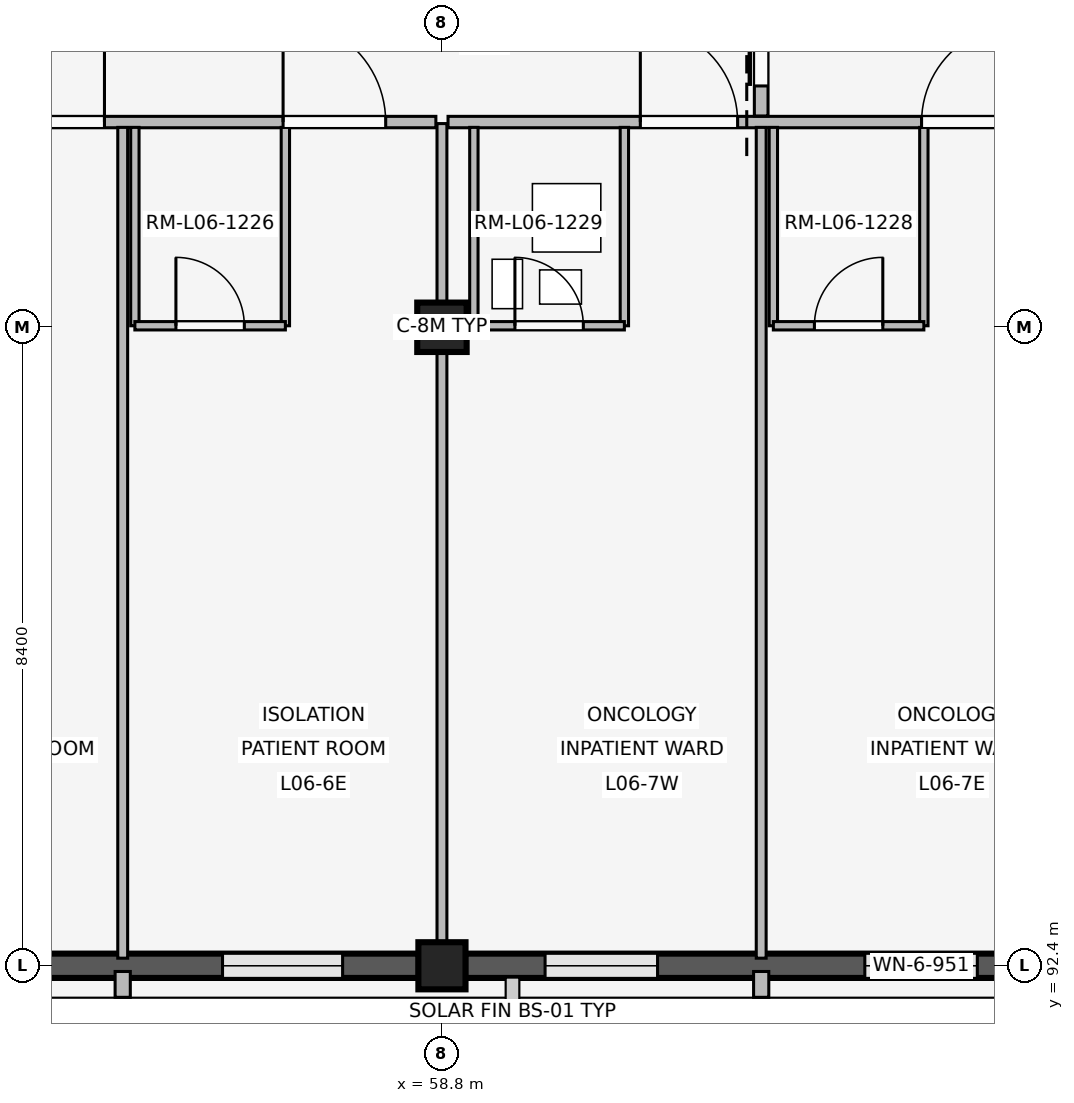
"""IFC4 building model, lengths in metres.
Left out: names, types, materials, properties, quantities, classifications, styles, units other than length and angle.
Written with IfcOpenShell. Run it as: python <this file> out.ifc"""

import sys

from ifc_helpers import new_model, si_unit, direction, frame, frame_2d, origin, origin_2d, place, context, subcontext, project, spatial, rectangle, extrude, element, fill, save


model = new_model("IFC4")
c1 = context("Model", 3, precision=1e-05, world=origin(), true_north=direction((0.0, 1.0)))
c2 = subcontext(c1, "Body", "Model", "MODEL_VIEW")
j1 = project(units=[si_unit("LENGTHUNIT", "METRE"), si_unit("PLANEANGLEUNIT", "RADIAN")], contexts=[c1])
p1 = place(None, origin())
s1 = spatial("IfcSite", under=j1, at=p1, CompositionType="ELEMENT")
p2 = place(p1, origin())
s2 = spatial("IfcBuilding", under=s1, at=p2, CompositionType="ELEMENT")
p3 = place(p2, frame((0.0, 0.0, 24.6)))
s3 = spatial("IfcBuildingStorey", under=s2, at=p3, CompositionType="ELEMENT", Elevation=24.6)
p4 = place(p3, frame((58.8, 92.4, 0.0), z_axis=(0.0, 0.0, 1.0), x_axis=(1.0, 0.0, 0.0)))
e1 = element("IfcColumn", 1, at=p4, inside=s3, PredefinedType="COLUMN", context=c2, shape_type="SweptSolid", body=[
    extrude(rectangle(XDim=0.62, YDim=0.62, at=origin_2d()), origin(), (0.0, 0.0, 1.0), 4.2),
])
p5 = place(p3, frame((58.8, 100.8, 0.0), z_axis=(0.0, 0.0, 1.0), x_axis=(1.0, 0.0, 0.0)))
e2 = element("IfcColumn", 2, at=p5, inside=s3, PredefinedType="COLUMN", context=c2, shape_type="SweptSolid", body=[
    extrude(rectangle(XDim=0.65, YDim=0.65, at=origin_2d()), origin(), (0.0, 0.0, 1.0), 4.2),
])
p6 = place(p3, frame((58.495, 92.4, 0.0), z_axis=(0.0, 0.0, 1.0), x_axis=(-1.0, 0.0, 0.0)))
e3 = element("IfcWall", 3, at=p6, inside=s3, PredefinedType="SOLIDWALL", context=c2, shape_type="SweptSolid", body=[
    extrude(rectangle(XDim=7.79, YDim=0.32, at=frame_2d((3.895, 0.0))), origin(), (0.0, 0.0, 1.0), 3.34),
])
p7 = place(p6, frame((1.002, 0.0, 0.85)))
e4 = element("IfcOpeningElement", 4, at=p7, cuts=e3, PredefinedType="OPENING", context=c2, shape_type="SweptSolid", body=[
    extrude(rectangle(XDim=1.58, YDim=1.7, at=frame_2d((0.79, 0.85))), frame((0.0, 0.17, 0.0), z_axis=(0.0, -1.0, 0.0), x_axis=(1.0, 0.0, 0.0)), (0.0, 0.0, 1.0), 0.34),
])
p8 = place(p6, frame((5.208, 0.0, 0.85)))
e5 = element("IfcOpeningElement", 5, at=p8, cuts=e3, PredefinedType="OPENING", context=c2, shape_type="SweptSolid", body=[
    extrude(rectangle(XDim=1.58, YDim=1.7, at=frame_2d((0.79, 0.85))), frame((0.0, 0.17, 0.0), z_axis=(0.0, -1.0, 0.0), x_axis=(1.0, 0.0, 0.0)), (0.0, 0.0, 1.0), 0.34),
])
p9 = place(p3, frame((54.6, 92.325, 0.0), z_axis=(0.0, 0.0, 1.0), x_axis=(0.0, -1.0, 0.0)))
e6 = element("IfcWall", 6, at=p9, inside=s3, PredefinedType="ELEMENTEDWALL", context=c2, shape_type="SweptSolid", body=[
    extrude(rectangle(XDim=0.34, YDim=0.2, at=frame_2d((0.17, 0.0))), origin(), (0.0, 0.0, 1.0), 3.32),
])
p10 = place(p3, frame((66.895, 92.4, 0.0), z_axis=(0.0, 0.0, 1.0), x_axis=(-1.0, 0.0, 0.0)))
e7 = element("IfcWall", 7, at=p10, inside=s3, PredefinedType="SOLIDWALL", context=c2, shape_type="SweptSolid", body=[
    extrude(rectangle(XDim=7.79, YDim=0.32, at=frame_2d((3.895, 0.0))), origin(), (0.0, 0.0, 1.0), 3.34),
])
p11 = place(p10, frame((1.052, 0.0, 0.85)))
e8 = element("IfcOpeningElement", 8, at=p11, cuts=e7, PredefinedType="OPENING", context=c2, shape_type="SweptSolid", body=[
    extrude(rectangle(XDim=1.48, YDim=1.6, at=frame_2d((0.74, 0.8))), frame((0.0, 0.17, 0.0), z_axis=(0.0, -1.0, 0.0), x_axis=(1.0, 0.0, 0.0)), (0.0, 0.0, 1.0), 0.34),
])
p12 = place(p10, frame((5.258, 0.0, 0.85)))
e9 = element("IfcOpeningElement", 9, at=p12, cuts=e7, PredefinedType="OPENING", context=c2, shape_type="SweptSolid", body=[
    extrude(rectangle(XDim=1.48, YDim=1.6, at=frame_2d((0.74, 0.8))), frame((0.0, 0.17, 0.0), z_axis=(0.0, -1.0, 0.0), x_axis=(1.0, 0.0, 0.0)), (0.0, 0.0, 1.0), 0.34),
])
p13 = place(p3, frame((63.0, 92.325, 0.0), z_axis=(0.0, 0.0, 1.0), x_axis=(0.0, -1.0, 0.0)))
e10 = element("IfcWall", 10, at=p13, inside=s3, PredefinedType="ELEMENTEDWALL", context=c2, shape_type="SweptSolid", body=[
    extrude(rectangle(XDim=0.34, YDim=0.2, at=frame_2d((0.17, 0.0))), origin(), (0.0, 0.0, 1.0), 3.32),
])
p14 = place(p3, frame((50.76, 103.5, 0.0), z_axis=(0.0, 0.0, 1.0), x_axis=(1.0, 0.0, 0.0)))
e11 = element("IfcWall", 11, at=p14, inside=s3, PredefinedType="PARTITIONING", context=c2, shape_type="SweptSolid", body=[
    extrude(rectangle(XDim=7.96, YDim=0.15, at=frame_2d((3.98, 0.0))), origin(), (0.0, 0.0, 1.0), 3.32),
])
p15 = place(p14, frame((2.25, 0.0, 0.0)))
e12 = element("IfcOpeningElement", 12, at=p15, cuts=e11, PredefinedType="OPENING", context=c2, shape_type="SweptSolid", body=[
    extrude(rectangle(XDim=1.35, YDim=2.25, at=frame_2d((0.675, 1.125))), frame((0.0, 0.085, 0.0), z_axis=(0.0, -1.0, 0.0), x_axis=(1.0, 0.0, 0.0)), (0.0, 0.0, 1.0), 0.17),
])
p16 = place(p14, frame((5.95, 0.0, 0.0)))
e13 = element("IfcOpeningElement", 13, at=p16, cuts=e11, PredefinedType="OPENING", context=c2, shape_type="SweptSolid", body=[
    extrude(rectangle(XDim=1.35, YDim=2.25, at=frame_2d((0.675, 1.125))), frame((0.0, 0.085, 0.0), z_axis=(0.0, -1.0, 0.0), x_axis=(1.0, 0.0, 0.0)), (0.0, 0.0, 1.0), 0.17),
])
p17 = place(p3, frame((54.6, 92.5, 0.0), z_axis=(0.0, 0.0, 1.0), x_axis=(0.0, 1.0, 0.0)))
e14 = element("IfcWall", 14, at=p17, inside=s3, PredefinedType="PARTITIONING", context=c2, shape_type="SweptSolid", body=[
    extrude(rectangle(XDim=10.93, YDim=0.13, at=frame_2d((5.465, 0.0))), origin(), (0.0, 0.0, 1.0), 3.32),
])
for number, where, z_axis, x_axis in (
    (15, (54.76, 100.82, 0.0), (0.0, 0.0, 1.0), (0.0, 1.0, 0.0)),
    (16, (56.74, 100.82, 0.0), (0.0, 0.0, 1.0), (0.0, 1.0, 0.0)),
):
    element("IfcWall", number, at=place(p3, frame(where, z_axis=z_axis, x_axis=x_axis)), inside=s3, PredefinedType="PARTITIONING", context=c2, shape_type="SweptSolid", body=[
        extrude(rectangle(XDim=2.61, YDim=0.11, at=frame_2d((1.305, 0.0))), origin(), (0.0, 0.0, 1.0), 3.32),
    ])
p18 = place(p3, frame((54.76, 100.82, 0.0), z_axis=(0.0, 0.0, 1.0), x_axis=(1.0, 0.0, 0.0)))
e17 = element("IfcWall", 17, at=p18, inside=s3, PredefinedType="PARTITIONING", context=c2, shape_type="SweptSolid", body=[
    extrude(rectangle(XDim=1.98, YDim=0.11, at=frame_2d((0.99, 0.0))), origin(), (0.0, 0.0, 1.0), 3.32),
])
p19 = place(p18, frame((0.54, 0.0, 0.0)))
e18 = element("IfcOpeningElement", 18, at=p19, cuts=e17, PredefinedType="OPENING", context=c2, shape_type="SweptSolid", body=[
    extrude(rectangle(XDim=0.9, YDim=2.1, at=frame_2d((0.45, 1.05))), frame((0.0, 0.065, 0.0), z_axis=(0.0, -1.0, 0.0), x_axis=(1.0, 0.0, 0.0)), (0.0, 0.0, 1.0), 0.13),
])
p20 = place(p3, frame((58.8, 92.54, 0.0), z_axis=(0.0, 0.0, 1.0), x_axis=(0.0, 1.0, 0.0)))
e19 = element("IfcWall", 19, at=p20, inside=s3, PredefinedType="PARTITIONING", context=c2, shape_type="SweptSolid", body=[
    extrude(rectangle(XDim=10.94, YDim=0.13, at=frame_2d((5.47, 0.0))), origin(), (0.0, 0.0, 1.0), 3.32),
])
p21 = place(p3, frame((58.88, 103.5, 0.0), z_axis=(0.0, 0.0, 1.0), x_axis=(1.0, 0.0, 0.0)))
e20 = element("IfcWall", 20, at=p21, inside=s3, PredefinedType="PARTITIONING", context=c2, shape_type="SweptSolid", body=[
    extrude(rectangle(XDim=8.24, YDim=0.15, at=frame_2d((4.12, 0.0))), origin(), (0.0, 0.0, 1.0), 3.32),
])
p22 = place(p21, frame((2.53, 0.0, 0.0)))
e21 = element("IfcOpeningElement", 21, at=p22, cuts=e20, PredefinedType="OPENING", context=c2, shape_type="SweptSolid", body=[
    extrude(rectangle(XDim=1.28, YDim=2.2, at=frame_2d((0.64, 1.1))), frame((0.0, 0.085, 0.0), z_axis=(0.0, -1.0, 0.0), x_axis=(1.0, 0.0, 0.0)), (0.0, 0.0, 1.0), 0.17),
])
p23 = place(p21, frame((6.23, 0.0, 0.0)))
e22 = element("IfcOpeningElement", 22, at=p23, cuts=e20, PredefinedType="OPENING", context=c2, shape_type="SweptSolid", body=[
    extrude(rectangle(XDim=1.28, YDim=2.2, at=frame_2d((0.64, 1.1))), frame((0.0, 0.085, 0.0), z_axis=(0.0, -1.0, 0.0), x_axis=(1.0, 0.0, 0.0)), (0.0, 0.0, 1.0), 0.17),
])
p24 = place(p3, frame((63.0, 92.5, 0.0), z_axis=(0.0, 0.0, 1.0), x_axis=(0.0, 1.0, 0.0)))
e23 = element("IfcWall", 23, at=p24, inside=s3, PredefinedType="PARTITIONING", context=c2, shape_type="SweptSolid", body=[
    extrude(rectangle(XDim=10.93, YDim=0.13, at=frame_2d((5.465, 0.0))), origin(), (0.0, 0.0, 1.0), 3.32),
])
for number, where, z_axis, x_axis in (
    (24, (59.22, 100.82, 0.0), (0.0, 0.0, 1.0), (0.0, 1.0, 0.0)),
    (25, (61.2, 100.82, 0.0), (0.0, 0.0, 1.0), (0.0, 1.0, 0.0)),
):
    element("IfcWall", number, at=place(p3, frame(where, z_axis=z_axis, x_axis=x_axis)), inside=s3, PredefinedType="PARTITIONING", context=c2, shape_type="SweptSolid", body=[
        extrude(rectangle(XDim=2.61, YDim=0.11, at=frame_2d((1.305, 0.0))), origin(), (0.0, 0.0, 1.0), 3.32),
    ])
p25 = place(p3, frame((59.22, 100.82, 0.0), z_axis=(0.0, 0.0, 1.0), x_axis=(1.0, 0.0, 0.0)))
e26 = element("IfcWall", 26, at=p25, inside=s3, PredefinedType="PARTITIONING", context=c2, shape_type="SweptSolid", body=[
    extrude(rectangle(XDim=1.98, YDim=0.11, at=frame_2d((0.99, 0.0))), origin(), (0.0, 0.0, 1.0), 3.32),
])
p26 = place(p25, frame((0.54, 0.0, 0.0)))
e27 = element("IfcOpeningElement", 27, at=p26, cuts=e26, PredefinedType="OPENING", context=c2, shape_type="SweptSolid", body=[
    extrude(rectangle(XDim=0.9, YDim=2.1, at=frame_2d((0.45, 1.05))), frame((0.0, 0.065, 0.0), z_axis=(0.0, -1.0, 0.0), x_axis=(1.0, 0.0, 0.0)), (0.0, 0.0, 1.0), 0.13),
])
for number, where, z_axis, x_axis in (
    (28, (63.16, 100.82, 0.0), (0.0, 0.0, 1.0), (0.0, 1.0, 0.0)),
    (29, (65.14, 100.82, 0.0), (0.0, 0.0, 1.0), (0.0, 1.0, 0.0)),
):
    element("IfcWall", number, at=place(p3, frame(where, z_axis=z_axis, x_axis=x_axis)), inside=s3, PredefinedType="PARTITIONING", context=c2, shape_type="SweptSolid", body=[
        extrude(rectangle(XDim=2.61, YDim=0.11, at=frame_2d((1.305, 0.0))), origin(), (0.0, 0.0, 1.0), 3.32),
    ])
p27 = place(p3, frame((63.16, 100.82, 0.0), z_axis=(0.0, 0.0, 1.0), x_axis=(1.0, 0.0, 0.0)))
e30 = element("IfcWall", 30, at=p27, inside=s3, PredefinedType="PARTITIONING", context=c2, shape_type="SweptSolid", body=[
    extrude(rectangle(XDim=1.98, YDim=0.11, at=frame_2d((0.99, 0.0))), origin(), (0.0, 0.0, 1.0), 3.32),
])
p28 = place(p27, frame((0.54, 0.0, 0.0)))
e31 = element("IfcOpeningElement", 31, at=p28, cuts=e30, PredefinedType="OPENING", context=c2, shape_type="SweptSolid", body=[
    extrude(rectangle(XDim=0.9, YDim=2.1, at=frame_2d((0.45, 1.05))), frame((0.0, 0.065, 0.0), z_axis=(0.0, -1.0, 0.0), x_axis=(1.0, 0.0, 0.0)), (0.0, 0.0, 1.0), 0.13),
])
p29 = place(p3, frame((63.0, 103.58, 0.0), z_axis=(0.0, 0.0, 1.0), x_axis=(0.0, 1.0, 0.0)))
e32 = element("IfcWall", 32, at=p29, inside=s3, PredefinedType="PARTITIONING", context=c2, shape_type="SweptSolid", body=[
    extrude(rectangle(XDim=2.84, YDim=0.18, at=frame_2d((1.42, 0.0))), origin(), (0.0, 0.0, 1.0), 3.32),
])
p30 = place(p29, frame((0.395, 0.0, 0.0)))
e33 = element("IfcOpeningElement", 33, at=p30, cuts=e32, PredefinedType="OPENING", context=c2, shape_type="SweptSolid", body=[
    extrude(rectangle(XDim=2.05, YDim=2.35, at=frame_2d((1.025, 1.175))), frame((0.0, 0.1, 0.0), z_axis=(0.0, -1.0, 0.0), x_axis=(1.0, 0.0, 0.0)), (0.0, 0.0, 1.0), 0.2),
])
p31 = place(p7, origin())
e34 = element("IfcWindow", 34, at=p31, inside=s3, PartitioningType="SINGLE_PANEL", PredefinedType="WINDOW", context=c2, shape_type="SweptSolid", body=[
    extrude(rectangle(XDim=1.58, YDim=1.7, at=frame_2d((0.79, 0.85))), frame((0.0, 0.03, 0.0), z_axis=(0.0, -1.0, 0.0), x_axis=(1.0, 0.0, 0.0)), (0.0, 0.0, 1.0), 0.06),
])
fill(e4, e34)
p32 = place(p11, origin())
e35 = element("IfcWindow", 35, at=p32, inside=s3, PartitioningType="SINGLE_PANEL", PredefinedType="WINDOW", context=c2, shape_type="SweptSolid", body=[
    extrude(rectangle(XDim=1.48, YDim=1.6, at=frame_2d((0.74, 0.8))), frame((0.0, 0.03, 0.0), z_axis=(0.0, -1.0, 0.0), x_axis=(1.0, 0.0, 0.0)), (0.0, 0.0, 1.0), 0.06),
])
fill(e8, e35)
p33 = place(p12, origin())
e36 = element("IfcWindow", 36, at=p33, inside=s3, PartitioningType="SINGLE_PANEL", PredefinedType="WINDOW", context=c2, shape_type="SweptSolid", body=[
    extrude(rectangle(XDim=1.48, YDim=1.6, at=frame_2d((0.74, 0.8))), frame((0.0, 0.03, 0.0), z_axis=(0.0, -1.0, 0.0), x_axis=(1.0, 0.0, 0.0)), (0.0, 0.0, 1.0), 0.06),
])
fill(e9, e36)
p34 = place(p15, origin())
e37 = element("IfcDoor", 37, at=p34, inside=s3, OperationType="SINGLE_SWING_RIGHT", PredefinedType="DOOR", context=c2, shape_type="SweptSolid", body=[
    extrude(rectangle(XDim=1.35, YDim=2.25, at=frame_2d((0.675, 1.125))), frame((0.0, 0.025, 0.0), z_axis=(0.0, -1.0, 0.0), x_axis=(1.0, 0.0, 0.0)), (0.0, 0.0, 1.0), 0.05),
])
fill(e12, e37)
p35 = place(p16, origin())
e38 = element("IfcDoor", 38, at=p35, inside=s3, OperationType="SINGLE_SWING_LEFT", PredefinedType="DOOR", context=c2, shape_type="SweptSolid", body=[
    extrude(rectangle(XDim=1.35, YDim=2.25, at=frame_2d((0.675, 1.125))), frame((0.0, 0.025, 0.0), z_axis=(0.0, -1.0, 0.0), x_axis=(1.0, 0.0, 0.0)), (0.0, 0.0, 1.0), 0.05),
])
fill(e13, e38)
p36 = place(p19, origin())
e39 = element("IfcDoor", 39, at=p36, inside=s3, OperationType="SINGLE_SWING_LEFT", PredefinedType="DOOR", context=c2, shape_type="SweptSolid", body=[
    extrude(rectangle(XDim=0.9, YDim=2.1, at=frame_2d((0.45, 1.05))), frame((0.0, 0.025, 0.0), z_axis=(0.0, -1.0, 0.0), x_axis=(1.0, 0.0, 0.0)), (0.0, 0.0, 1.0), 0.05),
])
fill(e18, e39)
p37 = place(p22, origin())
e40 = element("IfcDoor", 40, at=p37, inside=s3, OperationType="SINGLE_SWING_LEFT", PredefinedType="DOOR", context=c2, shape_type="SweptSolid", body=[
    extrude(rectangle(XDim=1.28, YDim=2.2, at=frame_2d((0.64, 1.1))), frame((0.0, 0.025, 0.0), z_axis=(0.0, -1.0, 0.0), x_axis=(1.0, 0.0, 0.0)), (0.0, 0.0, 1.0), 0.05),
])
fill(e21, e40)
p38 = place(p23, origin())
e41 = element("IfcDoor", 41, at=p38, inside=s3, OperationType="SINGLE_SWING_RIGHT", PredefinedType="DOOR", context=c2, shape_type="SweptSolid", body=[
    extrude(rectangle(XDim=1.28, YDim=2.2, at=frame_2d((0.64, 1.1))), frame((0.0, 0.025, 0.0), z_axis=(0.0, -1.0, 0.0), x_axis=(1.0, 0.0, 0.0)), (0.0, 0.0, 1.0), 0.05),
])
fill(e22, e41)
p39 = place(p26, origin())
e42 = element("IfcDoor", 42, at=p39, inside=s3, OperationType="SINGLE_SWING_LEFT", PredefinedType="DOOR", context=c2, shape_type="SweptSolid", body=[
    extrude(rectangle(XDim=0.9, YDim=2.1, at=frame_2d((0.45, 1.05))), frame((0.0, 0.025, 0.0), z_axis=(0.0, -1.0, 0.0), x_axis=(1.0, 0.0, 0.0)), (0.0, 0.0, 1.0), 0.05),
])
fill(e27, e42)
p40 = place(p28, origin())
e43 = element("IfcDoor", 43, at=p40, inside=s3, OperationType="SINGLE_SWING_RIGHT", PredefinedType="DOOR", context=c2, shape_type="SweptSolid", body=[
    extrude(rectangle(XDim=0.9, YDim=2.1, at=frame_2d((0.45, 1.05))), frame((0.0, 0.025, 0.0), z_axis=(0.0, -1.0, 0.0), x_axis=(1.0, 0.0, 0.0)), (0.0, 0.0, 1.0), 0.05),
])
fill(e31, e43)
p41 = place(p30, origin())
e44 = element("IfcDoor", 44, at=p41, inside=s3, OperationType="SLIDING_TO_LEFT", PredefinedType="DOOR", context=c2, shape_type="SweptSolid", body=[
    extrude(rectangle(XDim=2.05, YDim=2.35, at=frame_2d((1.025, 1.175))), frame((0.0, 0.025, 0.0), z_axis=(0.0, -1.0, 0.0), x_axis=(1.0, 0.0, 0.0)), (0.0, 0.0, 1.0), 0.05),
])
fill(e33, e44)
save(model, sys.argv[1])
